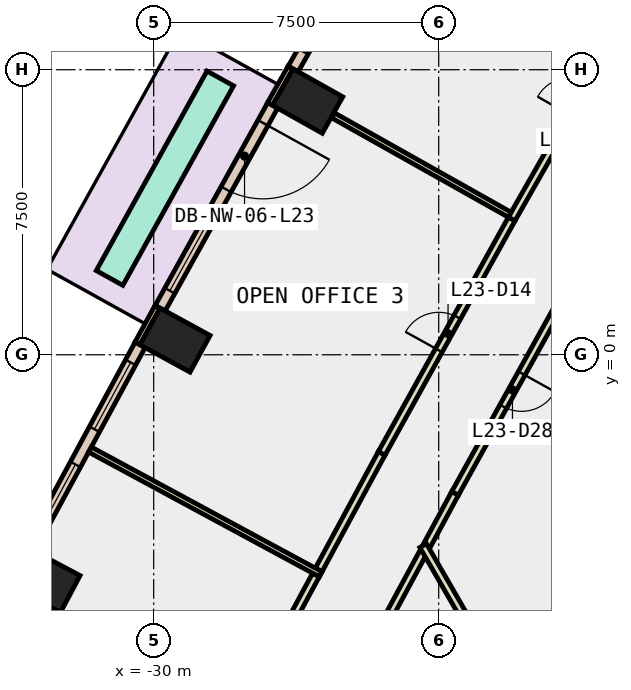
"""IFC4 building model, lengths in metres.
Left out: names, types, materials, properties, quantities, classifications, styles, units other than length and angle.
Written with IfcOpenShell. Run it as: python <this file> out.ifc"""

import sys

from ifc_helpers import new_model, si_unit, direction, frame, frame_2d, origin, origin_2d, place, context, subcontext, project, spatial, rectangle, extrude, element, fill, save


model = new_model("IFC4")
c1 = context("Model", 3, precision=1e-05, world=origin(), true_north=direction((0.0, 1.0)))
c2 = subcontext(c1, "Body", "Model", "MODEL_VIEW")
j1 = project(units=[si_unit("LENGTHUNIT", "METRE"), si_unit("PLANEANGLEUNIT", "RADIAN")], contexts=[c1])
p1 = place(None, origin())
s1 = spatial("IfcSite", under=j1, at=p1, CompositionType="ELEMENT")
p2 = place(p1, origin())
s2 = spatial("IfcBuilding", under=s1, at=p2, CompositionType="ELEMENT")
p3 = place(p2, frame((0.0, 0.0, 107.6)))
s3 = spatial("IfcBuildingStorey", under=s2, at=p3, CompositionType="ELEMENT", Elevation=107.6)
for number, where, z_axis, x_axis in (
    (1, (-25.948, 6.675, -0.4), (0.0, 0.0, 1.0), (0.49, 0.872, 0.0)),
    (2, (-29.438, 0.385, -0.4), (0.0, 0.0, 1.0), (0.48, 0.877, 0.0)),
    (3, (-32.858, -5.943, -0.4), (0.0, 0.0, 1.0), (0.469, 0.883, 0.0)),
):
    element("IfcColumn", number, at=place(p3, frame(where, z_axis=z_axis, x_axis=x_axis)), inside=s3, PredefinedType="COLUMN", context=c2, shape_type="SweptSolid", body=[
        extrude(rectangle(XDim=1.1, YDim=1.5, at=origin_2d()), origin(), (0.0, 0.0, 1.0), 4.2),
    ])
p4 = place(p3, frame((-26.398, 7.559, 0.0), z_axis=(0.0, 0.0, 1.0), x_axis=(-0.490008344094, -0.871717742574, 0.0)))
e4 = element("IfcWall", 4, at=p4, inside=s3, PredefinedType="STANDARD", context=c2, shape_type="SweptSolid", body=[
    extrude(rectangle(XDim=1.1, YDim=0.15, at=frame_2d((0.55, 0.0))), origin(), (0.0, 0.0, 1.0), 3.8),
])
p5 = place(p3, frame((-29.898, 1.264, 0.0), z_axis=(0.0, 0.0, 1.0), x_axis=(-0.479737645119, -0.877411985247, 0.0)))
e5 = element("IfcWall", 5, at=p5, inside=s3, PredefinedType="STANDARD", context=c2, shape_type="SweptSolid", body=[
    extrude(rectangle(XDim=1.101, YDim=0.15, at=frame_2d((0.55, 0.0))), origin(), (0.0, 0.0, 1.0), 3.8),
])
p6 = place(p3, frame((-23.308, 12.823, 0.0), z_axis=(0.0, 0.0, 1.0), x_axis=(-0.495113375427, -0.868828375154, 0.0)))
e6 = element("IfcWall", 6, at=p6, inside=s3, PredefinedType="STANDARD", context=c2, shape_type="SweptSolid", body=[
    extrude(rectangle(XDim=6.104, YDim=0.3, at=frame_2d((3.052, 0.0))), origin(), (0.0, 0.0, 1.0), 3.8),
])
p7 = place(p6, frame((0.526, 0.0, 0.9)))
e7 = element("IfcOpeningElement", 7, at=p7, cuts=e6, PredefinedType="OPENING", context=c2, shape_type="SweptSolid", body=[
    extrude(rectangle(XDim=2.0, YDim=2.6, at=frame_2d((1.0, 1.3))), frame((0.0, 0.16, 0.0), z_axis=(0.0, -1.0, 0.0), x_axis=(1.0, 0.0, 0.0)), (0.0, 0.0, 1.0), 0.32),
])
p8 = place(p6, frame((3.578, 0.0, 0.9)))
e8 = element("IfcOpeningElement", 8, at=p8, cuts=e6, PredefinedType="OPENING", context=c2, shape_type="SweptSolid", body=[
    extrude(rectangle(XDim=2.0, YDim=2.6, at=frame_2d((1.0, 1.3))), frame((0.0, 0.16, 0.0), z_axis=(0.0, -1.0, 0.0), x_axis=(1.0, 0.0, 0.0)), (0.0, 0.0, 1.0), 0.32),
])
p9 = place(p3, frame((-26.869, 6.562, 0.0), z_axis=(0.0, 0.0, 1.0), x_axis=(-0.485170774404, -0.874419418623, 0.0)))
e9 = element("IfcWall", 9, at=p9, inside=s3, PredefinedType="STANDARD", context=c2, shape_type="SweptSolid", body=[
    extrude(rectangle(XDim=6.103, YDim=0.3, at=frame_2d((3.052, 0.0))), origin(), (0.0, 0.0, 1.0), 3.8),
])
p10 = place(p9, frame((0.526, 0.0, 0.0)))
e10 = element("IfcOpeningElement", 10, at=p10, cuts=e9, PredefinedType="OPENING", context=c2, shape_type="SweptSolid", body=[
    extrude(rectangle(XDim=2.0, YDim=2.4, at=frame_2d((1.0, 1.2))), frame((0.0, 0.16, 0.0), z_axis=(0.0, -1.0, 0.0), x_axis=(1.0, 0.0, 0.0)), (0.0, 0.0, 1.0), 0.32),
])
p11 = place(p9, frame((3.578, 0.0, 0.9)))
e11 = element("IfcOpeningElement", 11, at=p11, cuts=e9, PredefinedType="OPENING", context=c2, shape_type="SweptSolid", body=[
    extrude(rectangle(XDim=2.0, YDim=2.6, at=frame_2d((1.0, 1.3))), frame((0.0, 0.16, 0.0), z_axis=(0.0, -1.0, 0.0), x_axis=(1.0, 0.0, 0.0)), (0.0, 0.0, 1.0), 0.32),
])
p12 = place(p3, frame((-30.357, 0.262, 0.0), z_axis=(0.0, 0.0, 1.0), x_axis=(-0.475573079782, -0.879676216449, 0.0)))
e12 = element("IfcWall", 12, at=p12, inside=s3, PredefinedType="STANDARD", context=c2, shape_type="SweptSolid", body=[
    extrude(rectangle(XDim=6.104, YDim=0.3, at=frame_2d((3.052, 0.0))), origin(), (0.0, 0.0, 1.0), 3.8),
])
p13 = place(p12, frame((0.526, 0.0, 0.9)))
e13 = element("IfcOpeningElement", 13, at=p13, cuts=e12, PredefinedType="OPENING", context=c2, shape_type="SweptSolid", body=[
    extrude(rectangle(XDim=2.0, YDim=2.6, at=frame_2d((1.0, 1.3))), frame((0.0, 0.16, 0.0), z_axis=(0.0, -1.0, 0.0), x_axis=(1.0, 0.0, 0.0)), (0.0, 0.0, 1.0), 0.32),
])
p14 = place(p12, frame((3.578, 0.0, 0.9)))
e14 = element("IfcOpeningElement", 14, at=p14, cuts=e12, PredefinedType="OPENING", context=c2, shape_type="SweptSolid", body=[
    extrude(rectangle(XDim=2.0, YDim=2.6, at=frame_2d((1.0, 1.3))), frame((0.0, 0.16, 0.0), z_axis=(0.0, -1.0, 0.0), x_axis=(1.0, 0.0, 0.0)), (0.0, 0.0, 1.0), 0.32),
])
p15 = place(p3, frame((-28.248, 7.271, 0.0), z_axis=(0.0, 0.0, 1.0), x_axis=(-0.485156044901, -0.874427591111, 0.0)))
e15 = element("IfcWall", 15, at=p15, inside=s3, PredefinedType="STANDARD", context=c2, shape_type="SweptSolid", body=[
    extrude(rectangle(XDim=6.004, YDim=0.8, at=frame_2d((3.002, 0.0))), origin(), (0.0, 0.0, 1.0), 0.8),
])
p16 = place(p3, frame((-19.047, 1.799, 0.0), z_axis=(0.0, 0.0, 1.0), x_axis=(-0.485240396382, -0.87438078531, 0.0)))
e16 = element("IfcWall", 16, at=p16, inside=s3, PredefinedType="PARTITIONING", context=c2, shape_type="SweptSolid", body=[
    extrude(rectangle(XDim=6.232, YDim=0.2, at=frame_2d((3.116, 0.0))), origin(), (0.0, 0.0, 1.0), 3.8),
])
p17 = place(p16, frame((2.616, 0.0, 0.0)))
e17 = element("IfcOpeningElement", 17, at=p17, cuts=e16, PredefinedType="OPENING", context=c2, shape_type="SweptSolid", body=[
    extrude(rectangle(XDim=1.0, YDim=2.1, at=frame_2d((0.5, 1.05))), frame((0.0, 0.11, 0.0), z_axis=(0.0, -1.0, 0.0), x_axis=(1.0, 0.0, 0.0)), (0.0, 0.0, 1.0), 0.22),
])
p18 = place(p3, frame((-22.071, -3.65, 0.0), z_axis=(0.0, 0.0, 1.0), x_axis=(-0.475212034938, -0.879871309823, 0.0)))
e18 = element("IfcWall", 18, at=p18, inside=s3, PredefinedType="PARTITIONING", context=c2, shape_type="SweptSolid", body=[
    extrude(rectangle(XDim=1.557, YDim=0.2, at=frame_2d((0.779, 0.0))), origin(), (0.0, 0.0, 1.0), 3.8),
])
p19 = place(p3, frame((-22.906, -5.196, 0.0), z_axis=(0.0, 0.0, 1.0), x_axis=(-0.475448213767, -0.879743710421, 0.0)))
e19 = element("IfcWall", 19, at=p19, inside=s3, PredefinedType="PARTITIONING", context=c2, shape_type="SweptSolid", body=[
    extrude(rectangle(XDim=5.343, YDim=0.2, at=frame_2d((2.671, 0.0))), origin(), (0.0, 0.0, 1.0), 3.8),
])
p20 = place(p3, frame((-20.581, 3.571, 0.0), z_axis=(0.0, 0.0, 1.0), x_axis=(0.495138372197, 0.868814129937, 0.0)))
e20 = element("IfcWall", 20, at=p20, inside=s3, PredefinedType="PARTITIONING", context=c2, shape_type="SweptSolid", body=[
    extrude(rectangle(XDim=7.124, YDim=0.2, at=frame_2d((3.562, 0.0))), origin(), (0.0, 0.0, 1.0), 3.8),
])
p21 = place(p20, frame((3.137, 0.0, 0.0)))
e21 = element("IfcOpeningElement", 21, at=p21, cuts=e20, PredefinedType="OPENING", context=c2, shape_type="SweptSolid", body=[
    extrude(rectangle(XDim=1.0, YDim=2.1, at=frame_2d((0.5, 1.05))), frame((0.0, 0.11, 0.0), z_axis=(0.0, -1.0, 0.0), x_axis=(1.0, 0.0, 0.0)), (0.0, 0.0, 1.0), 0.22),
])
p22 = place(p3, frame((-25.658, -5.661, 0.0), z_axis=(0.0, 0.0, 1.0), x_axis=(0.47543942367, 0.87974846088, 0.0)))
e22 = element("IfcWall", 22, at=p22, inside=s3, PredefinedType="PARTITIONING", context=c2, shape_type="SweptSolid", body=[
    extrude(rectangle(XDim=3.487, YDim=0.2, at=frame_2d((1.744, 0.0))), origin(), (0.0, 0.0, 1.0), 3.8),
])
p23 = place(p3, frame((-24.0, -2.593, 0.0), z_axis=(0.0, 0.0, 1.0), x_axis=(0.485148833338, 0.874431592242, 0.0)))
e23 = element("IfcWall", 23, at=p23, inside=s3, PredefinedType="PARTITIONING", context=c2, shape_type="SweptSolid", body=[
    extrude(rectangle(XDim=7.049, YDim=0.2, at=frame_2d((3.525, 0.0))), origin(), (0.0, 0.0, 1.0), 3.8),
])
p24 = place(p23, frame((3.099, 0.0, 0.0)))
e24 = element("IfcOpeningElement", 24, at=p24, cuts=e23, PredefinedType="OPENING", context=c2, shape_type="SweptSolid", body=[
    extrude(rectangle(XDim=1.0, YDim=2.1, at=frame_2d((0.5, 1.05))), frame((0.0, 0.11, 0.0), z_axis=(0.0, -1.0, 0.0), x_axis=(1.0, 0.0, 0.0)), (0.0, 0.0, 1.0), 0.22),
])
p25 = place(p3, frame((-27.387, -8.861, 0.0), z_axis=(0.0, 0.0, 1.0), x_axis=(0.475193364801, 0.879881393171, 0.0)))
e25 = element("IfcWall", 25, at=p25, inside=s3, PredefinedType="PARTITIONING", context=c2, shape_type="SweptSolid", body=[
    extrude(rectangle(XDim=3.487, YDim=0.2, at=frame_2d((1.744, 0.0))), origin(), (0.0, 0.0, 1.0), 3.8),
])
p26 = place(p3, frame((-19.278, -11.309, 0.0), z_axis=(0.0, 0.0, 1.0), x_axis=(-0.500044545065, 0.865999684151, 0.0)))
e26 = element("IfcWall", 26, at=p26, inside=s3, PredefinedType="PARTITIONING", context=c2, shape_type="SweptSolid", body=[
    extrude(rectangle(XDim=7.261, YDim=0.2, at=frame_2d((3.63, 0.0))), origin(), (0.0, 0.0, 1.0), 3.8),
])
p27 = place(p3, frame((-20.631, 3.685, 0.0), z_axis=(0.0, 0.0, 1.0), x_axis=(-0.871680720442, 0.490074200106, 0.0)))
e27 = element("IfcWall", 27, at=p27, inside=s3, PredefinedType="PARTITIONING", context=c2, shape_type="SweptSolid", body=[
    extrude(rectangle(XDim=5.33, YDim=0.15, at=frame_2d((2.665, 0.0))), origin(), (0.0, 0.0, 1.0), 3.8),
])
p28 = place(p3, frame((-25.606, -5.775, 0.0), z_axis=(0.0, 0.0, 1.0), x_axis=(-0.87974530848, 0.475445256793, 0.0)))
e28 = element("IfcWall", 28, at=p28, inside=s3, PredefinedType="PARTITIONING", context=c2, shape_type="SweptSolid", body=[
    extrude(rectangle(XDim=6.901, YDim=0.15, at=frame_2d((3.45, 0.0))), origin(), (0.0, 0.0, 1.0), 3.8),
])
p29 = place(p8, origin())
e29 = element("IfcWindow", 29, at=p29, inside=s3, PartitioningType="SINGLE_PANEL", PredefinedType="WINDOW", context=c2, shape_type="SweptSolid", body=[
    extrude(rectangle(XDim=2.0, YDim=2.6, at=frame_2d((1.0, 1.3))), frame((0.0, 0.03, 0.0), z_axis=(0.0, -1.0, 0.0), x_axis=(1.0, 0.0, 0.0)), (0.0, 0.0, 1.0), 0.06),
])
fill(e8, e29)
p30 = place(p10, origin())
e30 = element("IfcDoor", 30, at=p30, inside=s3, OperationType="SLIDING_TO_LEFT", PredefinedType="DOOR", context=c2, shape_type="SweptSolid", body=[
    extrude(rectangle(XDim=2.0, YDim=2.4, at=frame_2d((1.0, 1.2))), frame((0.0, 0.025, 0.0), z_axis=(0.0, -1.0, 0.0), x_axis=(1.0, 0.0, 0.0)), (0.0, 0.0, 1.0), 0.05),
])
fill(e10, e30)
p31 = place(p11, origin())
e31 = element("IfcWindow", 31, at=p31, inside=s3, PartitioningType="SINGLE_PANEL", PredefinedType="WINDOW", context=c2, shape_type="SweptSolid", body=[
    extrude(rectangle(XDim=2.0, YDim=2.6, at=frame_2d((1.0, 1.3))), frame((0.0, 0.03, 0.0), z_axis=(0.0, -1.0, 0.0), x_axis=(1.0, 0.0, 0.0)), (0.0, 0.0, 1.0), 0.06),
])
fill(e11, e31)
p32 = place(p13, origin())
e32 = element("IfcWindow", 32, at=p32, inside=s3, PartitioningType="SINGLE_PANEL", PredefinedType="WINDOW", context=c2, shape_type="SweptSolid", body=[
    extrude(rectangle(XDim=2.0, YDim=2.6, at=frame_2d((1.0, 1.3))), frame((0.0, 0.03, 0.0), z_axis=(0.0, -1.0, 0.0), x_axis=(1.0, 0.0, 0.0)), (0.0, 0.0, 1.0), 0.06),
])
fill(e13, e32)
p33 = place(p14, origin())
e33 = element("IfcWindow", 33, at=p33, inside=s3, PartitioningType="SINGLE_PANEL", PredefinedType="WINDOW", context=c2, shape_type="SweptSolid", body=[
    extrude(rectangle(XDim=2.0, YDim=2.6, at=frame_2d((1.0, 1.3))), frame((0.0, 0.03, 0.0), z_axis=(0.0, -1.0, 0.0), x_axis=(1.0, 0.0, 0.0)), (0.0, 0.0, 1.0), 0.06),
])
fill(e14, e33)
p34 = place(p24, origin())
e34 = element("IfcDoor", 34, at=p34, inside=s3, OperationType="SINGLE_SWING_LEFT", PredefinedType="DOOR", context=c2, shape_type="SweptSolid", body=[
    extrude(rectangle(XDim=1.0, YDim=2.1, at=frame_2d((0.5, 1.05))), frame((0.0, 0.025, 0.0), z_axis=(0.0, -1.0, 0.0), x_axis=(1.0, 0.0, 0.0)), (0.0, 0.0, 1.0), 0.05),
])
fill(e24, e34)
p35 = place(p17, origin())
e35 = element("IfcDoor", 35, at=p35, inside=s3, OperationType="SINGLE_SWING_LEFT", PredefinedType="DOOR", context=c2, shape_type="SweptSolid", body=[
    extrude(rectangle(XDim=1.0, YDim=2.1, at=frame_2d((0.5, 1.05))), frame((0.0, 0.025, 0.0), z_axis=(0.0, -1.0, 0.0), x_axis=(1.0, 0.0, 0.0)), (0.0, 0.0, 1.0), 0.05),
])
fill(e17, e35)
save(model, sys.argv[1])
